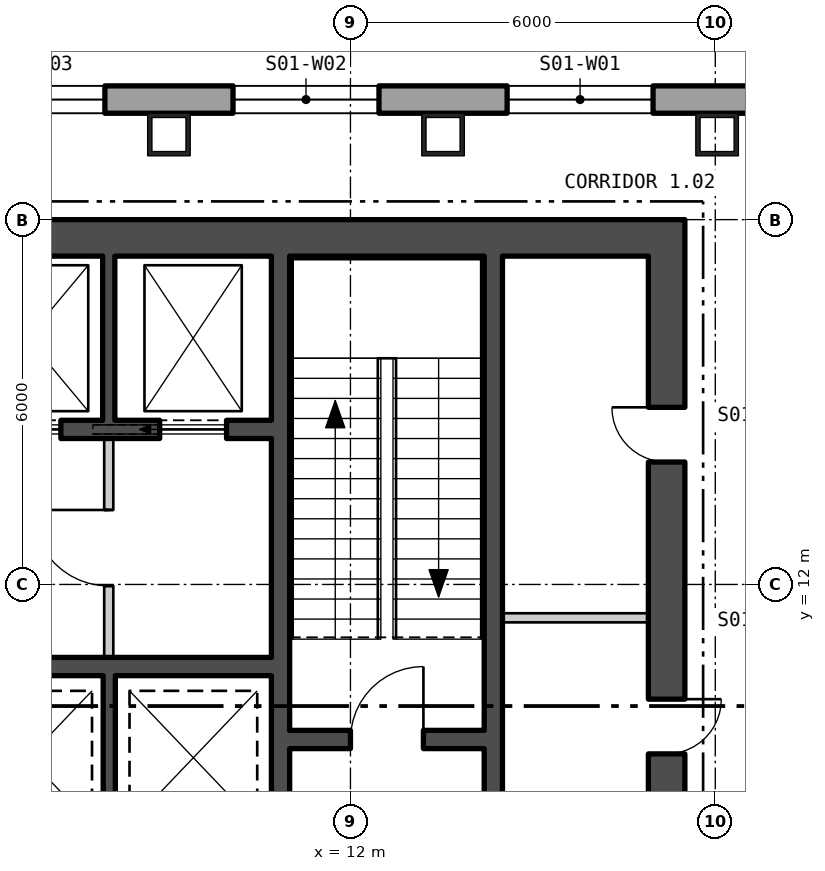
"""IFC4 building model, lengths in metres.
Left out: names, types, materials, properties, quantities, classifications, styles, units other than length and angle.
Written with IfcOpenShell. Run it as: python <this file> out.ifc"""

import sys

from ifc_helpers import new_model, si_unit, direction, frame, frame_2d, origin, origin_2d, place, context, subcontext, project, spatial, polyline, rectangle, hollow_rectangle, outline, extrude, element, fill, save


model = new_model("IFC4")
c1 = context("Model", 3, precision=1e-05, world=origin(), true_north=direction((0.0, 1.0)))
c2 = subcontext(c1, "Body", "Model", "MODEL_VIEW")
j1 = project(units=[si_unit("LENGTHUNIT", "METRE"), si_unit("PLANEANGLEUNIT", "RADIAN")], contexts=[c1])
p1 = place(None, origin())
s1 = spatial("IfcSite", under=j1, at=p1, CompositionType="ELEMENT")
p2 = place(p1, origin())
s2 = spatial("IfcBuilding", under=s1, at=p2, CompositionType="ELEMENT")
p3 = place(p2, frame((0.0, 0.0, 28.8)))
s3 = spatial("IfcBuildingStorey", under=s2, at=p3, CompositionType="ELEMENT", Elevation=28.8)
p4 = place(p3, frame((18.03, 19.4, -0.85), z_axis=(0.0, 0.0, 1.0), x_axis=(-1.0, 0.0, 0.0)))
e1 = element("IfcColumn", 1, at=p4, inside=s3, PredefinedType="COLUMN", context=c2, shape_type="SweptSolid", body=[
    extrude(hollow_rectangle(XDim=0.7, YDim=0.7, WallThickness=0.07, at=origin_2d()), origin(), (0.0, 0.0, 1.0), 5.35),
])
p5 = place(p3, frame((13.523, 19.4, 0.0), z_axis=(0.0, 0.0, 1.0), x_axis=(-1.0, 0.0, 0.0)))
e2 = element("IfcColumn", 2, at=p5, inside=s3, PredefinedType="COLUMN", context=c2, shape_type="SweptSolid", body=[
    extrude(hollow_rectangle(XDim=0.7, YDim=0.7, WallThickness=0.07, at=origin_2d()), origin(), (0.0, 0.0, 1.0), 4.5),
])
p6 = place(p3, frame((9.015, 19.4, -0.85), z_axis=(0.0, 0.0, 1.0), x_axis=(-1.0, 0.0, 0.0)))
e3 = element("IfcColumn", 3, at=p6, inside=s3, PredefinedType="COLUMN", context=c2, shape_type="SweptSolid", body=[
    extrude(hollow_rectangle(XDim=0.7, YDim=0.7, WallThickness=0.07, at=origin_2d()), origin(), (0.0, 0.0, 1.0), 5.35),
])
p7 = place(p3, frame((22.87, 19.975, -0.4), z_axis=(0.0, 0.0, 1.0), x_axis=(-1.0, 0.0, 0.0)))
e4 = element("IfcWall", 4, at=p7, inside=s3, PredefinedType="SOLIDWALL", context=c2, shape_type="SweptSolid", body=[
    extrude(outline(polyline([(-0.13, -0.225), (45.87, -0.225), (45.61, 0.225), (0.13, 0.225), (-0.13, -0.225)])), origin(), (0.0, 0.0, 1.0), 4.5),
])
p8 = place(p7, frame((5.893, 0.0, 1.3)))
e5 = element("IfcOpeningElement", 5, at=p8, cuts=e4, PredefinedType="OPENING", context=c2, shape_type="SweptSolid", body=[
    extrude(rectangle(XDim=2.4, YDim=2.6, at=frame_2d((1.2, 1.3))), frame((0.0, 0.235, 0.0), z_axis=(0.0, -1.0, 0.0), x_axis=(1.0, 0.0, 0.0)), (0.0, 0.0, 1.0), 0.47),
])
p9 = place(p7, frame((10.401, 0.0, 1.3)))
e6 = element("IfcOpeningElement", 6, at=p9, cuts=e4, PredefinedType="OPENING", context=c2, shape_type="SweptSolid", body=[
    extrude(rectangle(XDim=2.4, YDim=2.6, at=frame_2d((1.2, 1.3))), frame((0.0, 0.235, 0.0), z_axis=(0.0, -1.0, 0.0), x_axis=(1.0, 0.0, 0.0)), (0.0, 0.0, 1.0), 0.47),
])
p10 = place(p7, frame((14.909, 0.0, 1.3)))
e7 = element("IfcOpeningElement", 7, at=p10, cuts=e4, PredefinedType="OPENING", context=c2, shape_type="SweptSolid", body=[
    extrude(rectangle(XDim=2.4, YDim=2.6, at=frame_2d((1.2, 1.3))), frame((0.0, 0.235, 0.0), z_axis=(0.0, -1.0, 0.0), x_axis=(1.0, 0.0, 0.0)), (0.0, 0.0, 1.0), 0.47),
])
p11 = place(p7, frame((19.416, 0.0, 1.3)))
e8 = element("IfcOpeningElement", 8, at=p11, cuts=e4, PredefinedType="OPENING", context=c2, shape_type="SweptSolid", body=[
    extrude(rectangle(XDim=2.4, YDim=2.6, at=frame_2d((1.2, 1.3))), frame((0.0, 0.235, 0.0), z_axis=(0.0, -1.0, 0.0), x_axis=(1.0, 0.0, 0.0)), (0.0, 0.0, 1.0), 0.47),
])
p12 = place(p7, frame((23.924, 0.0, 1.3)))
e9 = element("IfcOpeningElement", 9, at=p12, cuts=e4, PredefinedType="OPENING", context=c2, shape_type="SweptSolid", body=[
    extrude(rectangle(XDim=2.4, YDim=2.6, at=frame_2d((1.2, 1.3))), frame((0.0, 0.235, 0.0), z_axis=(0.0, -1.0, 0.0), x_axis=(1.0, 0.0, 0.0)), (0.0, 0.0, 1.0), 0.47),
])
p13 = place(p7, frame((28.431, 0.0, 1.3)))
e10 = element("IfcOpeningElement", 10, at=p13, cuts=e4, PredefinedType="OPENING", context=c2, shape_type="SweptSolid", body=[
    extrude(rectangle(XDim=2.4, YDim=2.6, at=frame_2d((1.2, 1.3))), frame((0.0, 0.235, 0.0), z_axis=(0.0, -1.0, 0.0), x_axis=(1.0, 0.0, 0.0)), (0.0, 0.0, 1.0), 0.47),
])
p14 = place(p7, frame((32.939, 0.0, 1.3)))
e11 = element("IfcOpeningElement", 11, at=p14, cuts=e4, PredefinedType="OPENING", context=c2, shape_type="SweptSolid", body=[
    extrude(rectangle(XDim=2.4, YDim=2.6, at=frame_2d((1.2, 1.3))), frame((0.0, 0.235, 0.0), z_axis=(0.0, -1.0, 0.0), x_axis=(1.0, 0.0, 0.0)), (0.0, 0.0, 1.0), 0.47),
])
p15 = place(p7, frame((37.447, 0.0, 1.3)))
e12 = element("IfcOpeningElement", 12, at=p15, cuts=e4, PredefinedType="OPENING", context=c2, shape_type="SweptSolid", body=[
    extrude(rectangle(XDim=2.4, YDim=2.6, at=frame_2d((1.2, 1.3))), frame((0.0, 0.235, 0.0), z_axis=(0.0, -1.0, 0.0), x_axis=(1.0, 0.0, 0.0)), (0.0, 0.0, 1.0), 0.47),
])
p16 = place(p3, frame((5.87, -29.805, -0.23), z_axis=(0.0, 0.0, 1.0), x_axis=(0.499999764979, 0.866025539474, 0.0)))
e13 = element("IfcWall", 13, at=p16, inside=s3, PredefinedType="SOLIDWALL", context=c2, shape_type="SweptSolid", body=[
    extrude(outline(polyline([(-0.13, -0.225), (45.87, -0.225), (45.61, 0.225), (0.13, 0.225), (-0.13, -0.225)])), origin(), (0.0, 0.0, 1.0), 4.55),
])
p17 = place(p16, frame((1.424, 0.0, 1.13)))
e14 = element("IfcOpeningElement", 14, at=p17, cuts=e13, PredefinedType="OPENING", context=c2, shape_type="SweptSolid", body=[
    extrude(rectangle(XDim=2.4, YDim=2.6, at=frame_2d((1.2, 1.3))), frame((0.0, 0.235, 0.0), z_axis=(0.0, -1.0, 0.0), x_axis=(1.0, 0.0, 0.0)), (0.0, 0.0, 1.0), 0.47),
])
p18 = place(p16, frame((5.893, 0.0, 1.13)))
e15 = element("IfcOpeningElement", 15, at=p18, cuts=e13, PredefinedType="OPENING", context=c2, shape_type="SweptSolid", body=[
    extrude(rectangle(XDim=2.4, YDim=2.6, at=frame_2d((1.2, 1.3))), frame((0.0, 0.235, 0.0), z_axis=(0.0, -1.0, 0.0), x_axis=(1.0, 0.0, 0.0)), (0.0, 0.0, 1.0), 0.47),
])
p19 = place(p16, frame((10.701, 0.0, 0.23)))
e16 = element("IfcOpeningElement", 16, at=p19, cuts=e13, PredefinedType="OPENING", context=c2, shape_type="SweptSolid", body=[
    extrude(rectangle(XDim=1.8, YDim=2.4, at=frame_2d((0.9, 1.2))), frame((0.0, 0.235, 0.0), z_axis=(0.0, -1.0, 0.0), x_axis=(1.0, 0.0, 0.0)), (0.0, 0.0, 1.0), 0.47),
])
p20 = place(p16, frame((14.909, 0.0, 1.13)))
e17 = element("IfcOpeningElement", 17, at=p20, cuts=e13, PredefinedType="OPENING", context=c2, shape_type="SweptSolid", body=[
    extrude(rectangle(XDim=2.4, YDim=2.6, at=frame_2d((1.2, 1.3))), frame((0.0, 0.235, 0.0), z_axis=(0.0, -1.0, 0.0), x_axis=(1.0, 0.0, 0.0)), (0.0, 0.0, 1.0), 0.47),
])
p21 = place(p16, frame((19.416, 0.0, 1.13)))
e18 = element("IfcOpeningElement", 18, at=p21, cuts=e13, PredefinedType="OPENING", context=c2, shape_type="SweptSolid", body=[
    extrude(rectangle(XDim=2.4, YDim=2.6, at=frame_2d((1.2, 1.3))), frame((0.0, 0.235, 0.0), z_axis=(0.0, -1.0, 0.0), x_axis=(1.0, 0.0, 0.0)), (0.0, 0.0, 1.0), 0.47),
])
p22 = place(p16, frame((23.924, 0.0, 1.13)))
e19 = element("IfcOpeningElement", 19, at=p22, cuts=e13, PredefinedType="OPENING", context=c2, shape_type="SweptSolid", body=[
    extrude(rectangle(XDim=2.4, YDim=2.6, at=frame_2d((1.2, 1.3))), frame((0.0, 0.235, 0.0), z_axis=(0.0, -1.0, 0.0), x_axis=(1.0, 0.0, 0.0)), (0.0, 0.0, 1.0), 0.47),
])
p23 = place(p16, frame((37.447, 0.0, 1.13)))
e20 = element("IfcOpeningElement", 20, at=p23, cuts=e13, PredefinedType="OPENING", context=c2, shape_type="SweptSolid", body=[
    extrude(rectangle(XDim=2.4, YDim=2.6, at=frame_2d((1.2, 1.3))), frame((0.0, 0.235, 0.0), z_axis=(0.0, -1.0, 0.0), x_axis=(1.0, 0.0, 0.0)), (0.0, 0.0, 1.0), 0.47),
])
p24 = place(p16, frame((42.216, 0.0, 0.23)))
e21 = element("IfcOpeningElement", 21, at=p24, cuts=e13, PredefinedType="OPENING", context=c2, shape_type="SweptSolid", body=[
    extrude(rectangle(XDim=1.8, YDim=2.4, at=frame_2d((0.9, 1.2))), frame((0.0, 0.235, 0.0), z_axis=(0.0, -1.0, 0.0), x_axis=(1.0, 0.0, 0.0)), (0.0, 0.0, 1.0), 0.47),
])
p25 = place(p3, frame((-17.5, 17.7, 0.0), z_axis=(0.0, 0.0, 1.0), x_axis=(1.0, 0.0, 0.0)))
e22 = element("IfcWall", 22, at=p25, inside=s3, PredefinedType="SHEAR", context=c2, shape_type="SweptSolid", body=[
    extrude(rectangle(XDim=35.0, YDim=0.6, at=frame_2d((17.5, 0.0))), origin(), (0.0, 0.0, 1.0), 4.3),
])
p26 = place(p3, frame((17.2, 0.6, 0.0), z_axis=(0.0, 0.0, 1.0), x_axis=(0.0, 1.0, 0.0)))
e23 = element("IfcWall", 23, at=p26, inside=s3, PredefinedType="SHEAR", context=c2, shape_type="SweptSolid", body=[
    extrude(rectangle(XDim=16.8, YDim=0.6, at=frame_2d((8.4, 0.0))), origin(), (0.0, 0.0, 1.0), 4.3),
])
p27 = place(p26, frame((5.7, 0.0, 0.0)))
e24 = element("IfcOpeningElement", 24, at=p27, cuts=e23, PredefinedType="OPENING", context=c2, shape_type="SweptSolid", body=[
    extrude(rectangle(XDim=1.5, YDim=2.1, at=frame_2d((0.75, 1.05))), frame((0.0, 0.31, 0.0), z_axis=(0.0, -1.0, 0.0), x_axis=(1.0, 0.0, 0.0)), (0.0, 0.0, 1.0), 0.62),
])
p28 = place(p26, frame((1.5, 0.0, 0.0)))
e25 = element("IfcOpeningElement", 25, at=p28, cuts=e23, PredefinedType="OPENING", context=c2, shape_type="SweptSolid", body=[
    extrude(rectangle(XDim=0.9, YDim=2.1, at=frame_2d((0.45, 1.05))), frame((0.0, 0.31, 0.0), z_axis=(0.0, -1.0, 0.0), x_axis=(1.0, 0.0, 0.0)), (0.0, 0.0, 1.0), 0.62),
])
p29 = place(p26, frame((4.3, 0.0, 0.0)))
e26 = element("IfcOpeningElement", 26, at=p29, cuts=e23, PredefinedType="OPENING", context=c2, shape_type="SweptSolid", body=[
    extrude(rectangle(XDim=1.0, YDim=2.1, at=frame_2d((0.5, 1.05))), frame((0.0, 0.31, 0.0), z_axis=(0.0, -1.0, 0.0), x_axis=(1.0, 0.0, 0.0)), (0.0, 0.0, 1.0), 0.62),
])
p30 = place(p26, frame((8.613, 0.0, 0.0)))
e27 = element("IfcOpeningElement", 27, at=p30, cuts=e23, PredefinedType="OPENING", context=c2, shape_type="SweptSolid", body=[
    extrude(rectangle(XDim=0.9, YDim=2.1, at=frame_2d((0.45, 1.05))), frame((0.0, 0.31, 0.0), z_axis=(0.0, -1.0, 0.0), x_axis=(1.0, 0.0, 0.0)), (0.0, 0.0, 1.0), 0.62),
])
p31 = place(p26, frame((13.413, 0.0, 0.0)))
e28 = element("IfcOpeningElement", 28, at=p31, cuts=e23, PredefinedType="OPENING", context=c2, shape_type="SweptSolid", body=[
    extrude(rectangle(XDim=0.9, YDim=2.1, at=frame_2d((0.45, 1.05))), frame((0.0, 0.31, 0.0), z_axis=(0.0, -1.0, 0.0), x_axis=(1.0, 0.0, 0.0)), (0.0, 0.0, 1.0), 0.62),
])
p32 = place(p3, frame((10.85, 0.6, 0.0), z_axis=(0.0, 0.0, 1.0), x_axis=(0.0, 1.0, 0.0)))
e29 = element("IfcWall", 29, at=p32, inside=s3, PredefinedType="SHEAR", context=c2, shape_type="SweptSolid", body=[
    extrude(rectangle(XDim=16.8, YDim=0.3, at=frame_2d((8.4, 0.0))), origin(), (0.0, 0.0, 1.0), 4.3),
])
p33 = place(p32, frame((5.075, 0.0, 0.0)))
e30 = element("IfcOpeningElement", 30, at=p33, cuts=e29, PredefinedType="OPENING", context=c2, shape_type="SweptSolid", body=[
    extrude(rectangle(XDim=1.25, YDim=2.1, at=frame_2d((0.625, 1.05))), frame((0.0, 0.16, 0.0), z_axis=(0.0, -1.0, 0.0), x_axis=(1.0, 0.0, 0.0)), (0.0, 0.0, 1.0), 0.32),
])
p34 = place(p32, frame((1.525, 0.0, 0.0)))
e31 = element("IfcOpeningElement", 31, at=p34, cuts=e29, PredefinedType="OPENING", context=c2, shape_type="SweptSolid", body=[
    extrude(rectangle(XDim=1.0, YDim=2.1, at=frame_2d((0.5, 1.05))), frame((0.0, 0.16, 0.0), z_axis=(0.0, -1.0, 0.0), x_axis=(1.0, 0.0, 0.0)), (0.0, 0.0, 1.0), 0.32),
])
p35 = place(p3, frame((14.35, 0.6, 0.0), z_axis=(0.0, 0.0, 1.0), x_axis=(0.0, 1.0, 0.0)))
e32 = element("IfcWall", 32, at=p35, inside=s3, PredefinedType="SHEAR", context=c2, shape_type="SweptSolid", body=[
    extrude(rectangle(XDim=16.8, YDim=0.3, at=frame_2d((8.4, 0.0))), origin(), (0.0, 0.0, 1.0), 4.3),
])
p36 = place(p35, frame((5.7, 0.0, 0.0)))
e33 = element("IfcOpeningElement", 33, at=p36, cuts=e32, PredefinedType="OPENING", context=c2, shape_type="SweptSolid", body=[
    extrude(rectangle(XDim=1.5, YDim=2.1, at=frame_2d((0.75, 1.05))), frame((0.0, 0.16, 0.0), z_axis=(0.0, -1.0, 0.0), x_axis=(1.0, 0.0, 0.0)), (0.0, 0.0, 1.0), 0.32),
])
p37 = place(p3, frame((11.0, 9.45, 0.0), z_axis=(0.0, 0.0, 1.0), x_axis=(1.0, 0.0, 0.0)))
e34 = element("IfcWall", 34, at=p37, inside=s3, PredefinedType="SHEAR", context=c2, shape_type="SweptSolid", body=[
    extrude(rectangle(XDim=3.2, YDim=0.3, at=frame_2d((1.6, 0.0))), origin(), (0.0, 0.0, 1.0), 4.3),
])
p38 = place(p37, frame((1.0, 0.0, 0.0)))
e35 = element("IfcOpeningElement", 35, at=p38, cuts=e34, PredefinedType="OPENING", context=c2, shape_type="SweptSolid", body=[
    extrude(rectangle(XDim=1.2, YDim=2.1, at=frame_2d((0.6, 1.05))), frame((0.0, 0.16, 0.0), z_axis=(0.0, -1.0, 0.0), x_axis=(1.0, 0.0, 0.0)), (0.0, 0.0, 1.0), 0.32),
])
p39 = place(p3, frame((-10.7, 14.55, 0.0), z_axis=(0.0, 0.0, 1.0), x_axis=(1.0, 0.0, 0.0)))
e36 = element("IfcWall", 36, at=p39, inside=s3, PredefinedType="SHEAR", context=c2, shape_type="SweptSolid", body=[
    extrude(rectangle(XDim=21.4, YDim=0.3, at=frame_2d((10.7, 0.0))), origin(), (0.0, 0.0, 1.0), 4.3),
])
p40 = place(p39, frame((0.738, 0.0, 0.0)))
e37 = element("IfcOpeningElement", 37, at=p40, cuts=e36, PredefinedType="OPENING", context=c2, shape_type="SweptSolid", body=[
    extrude(rectangle(XDim=1.1, YDim=2.1, at=frame_2d((0.55, 1.05))), frame((0.0, 0.16, 0.0), z_axis=(0.0, -1.0, 0.0), x_axis=(1.0, 0.0, 0.0)), (0.0, 0.0, 1.0), 0.32),
])
p41 = place(p39, frame((3.462, 0.0, 0.0)))
e38 = element("IfcOpeningElement", 38, at=p41, cuts=e36, PredefinedType="OPENING", context=c2, shape_type="SweptSolid", body=[
    extrude(rectangle(XDim=1.1, YDim=2.1, at=frame_2d((0.55, 1.05))), frame((0.0, 0.16, 0.0), z_axis=(0.0, -1.0, 0.0), x_axis=(1.0, 0.0, 0.0)), (0.0, 0.0, 1.0), 0.32),
])
p42 = place(p39, frame((6.138, 0.0, 0.0)))
e39 = element("IfcOpeningElement", 39, at=p42, cuts=e36, PredefinedType="OPENING", context=c2, shape_type="SweptSolid", body=[
    extrude(rectangle(XDim=1.1, YDim=2.1, at=frame_2d((0.55, 1.05))), frame((0.0, 0.16, 0.0), z_axis=(0.0, -1.0, 0.0), x_axis=(1.0, 0.0, 0.0)), (0.0, 0.0, 1.0), 0.32),
])
p43 = place(p39, frame((8.812, 0.0, 0.0)))
e40 = element("IfcOpeningElement", 40, at=p43, cuts=e36, PredefinedType="OPENING", context=c2, shape_type="SweptSolid", body=[
    extrude(rectangle(XDim=1.1, YDim=2.1, at=frame_2d((0.55, 1.05))), frame((0.0, 0.16, 0.0), z_axis=(0.0, -1.0, 0.0), x_axis=(1.0, 0.0, 0.0)), (0.0, 0.0, 1.0), 0.32),
])
p44 = place(p39, frame((14.162, 0.0, 0.0)))
e41 = element("IfcOpeningElement", 41, at=p44, cuts=e36, PredefinedType="OPENING", context=c2, shape_type="SweptSolid", body=[
    extrude(rectangle(XDim=1.1, YDim=2.1, at=frame_2d((0.55, 1.05))), frame((0.0, 0.16, 0.0), z_axis=(0.0, -1.0, 0.0), x_axis=(1.0, 0.0, 0.0)), (0.0, 0.0, 1.0), 0.32),
])
p45 = place(p39, frame((16.837, 0.0, 0.0)))
e42 = element("IfcOpeningElement", 42, at=p45, cuts=e36, PredefinedType="OPENING", context=c2, shape_type="SweptSolid", body=[
    extrude(rectangle(XDim=1.1, YDim=2.1, at=frame_2d((0.55, 1.05))), frame((0.0, 0.16, 0.0), z_axis=(0.0, -1.0, 0.0), x_axis=(1.0, 0.0, 0.0)), (0.0, 0.0, 1.0), 0.32),
])
p46 = place(p39, frame((19.562, 0.0, 0.0)))
e43 = element("IfcOpeningElement", 43, at=p46, cuts=e36, PredefinedType="OPENING", context=c2, shape_type="SweptSolid", body=[
    extrude(rectangle(XDim=1.1, YDim=2.1, at=frame_2d((0.55, 1.05))), frame((0.0, 0.16, 0.0), z_axis=(0.0, -1.0, 0.0), x_axis=(1.0, 0.0, 0.0)), (0.0, 0.0, 1.0), 0.32),
])
p47 = place(p3, frame((2.6, 10.65, 0.0), z_axis=(0.0, 0.0, 1.0), x_axis=(1.0, 0.0, 0.0)))
e44 = element("IfcWall", 44, at=p47, inside=s3, PredefinedType="SHEAR", context=c2, shape_type="SweptSolid", body=[
    extrude(rectangle(XDim=8.1, YDim=0.3, at=frame_2d((4.05, 0.0))), origin(), (0.0, 0.0, 1.0), 4.3),
])
for number, where, z_axis, x_axis in (
    (45, (8.025, 14.7, 0.0), (0.0, 0.0, 1.0), (0.0, 1.0, 0.0)),
    (46, (8.033, 7.8, 0.0), (0.0, 0.0, 1.0), (0.0, 1.0, 0.0)),
):
    element("IfcWall", number, at=place(p3, frame(where, z_axis=z_axis, x_axis=x_axis)), inside=s3, PredefinedType="SHEAR", context=c2, shape_type="SweptSolid", body=[
        extrude(rectangle(XDim=2.7, YDim=0.2, at=frame_2d((1.35, 0.0))), origin(), (0.0, 0.0, 1.0), 4.3),
    ])
p48 = place(p3, frame((8.025, 10.8, 0.0), z_axis=(0.0, 0.0, 1.0), x_axis=(0.0, 1.0, 0.0)))
e47 = element("IfcWall", 47, at=p48, inside=s3, PredefinedType="PARTITIONING", context=c2, shape_type="SweptSolid", body=[
    extrude(rectangle(XDim=3.6, YDim=0.15, at=frame_2d((1.8, 0.0))), origin(), (0.0, 0.0, 1.0), 4.3),
])
p49 = place(p48, frame((1.175, 0.0, 0.0)))
e48 = element("IfcOpeningElement", 48, at=p49, cuts=e47, PredefinedType="OPENING", context=c2, shape_type="SweptSolid", body=[
    extrude(rectangle(XDim=1.25, YDim=2.1, at=frame_2d((0.625, 1.05))), frame((0.0, 0.085, 0.0), z_axis=(0.0, -1.0, 0.0), x_axis=(1.0, 0.0, 0.0)), (0.0, 0.0, 1.0), 0.17),
])
p50 = place(p3, frame((14.5, 11.451, 0.0), z_axis=(0.0, 0.0, 1.0), x_axis=(1.0, 0.0, 0.0)))
e49 = element("IfcWall", 49, at=p50, inside=s3, PredefinedType="PARTITIONING", context=c2, shape_type="SweptSolid", body=[
    extrude(rectangle(XDim=2.4, YDim=0.15, at=frame_2d((1.2, 0.0))), origin(), (0.0, 0.0, 1.0), 4.3),
])
p51 = place(p8, origin())
e50 = element("IfcWindow", 50, at=p51, inside=s3, PartitioningType="SINGLE_PANEL", PredefinedType="WINDOW", context=c2, shape_type="SweptSolid", body=[
    extrude(rectangle(XDim=2.4, YDim=2.6, at=frame_2d((1.2, 1.3))), frame((0.0, 0.105, 0.0), z_axis=(0.0, -1.0, 0.0), x_axis=(1.0, 0.0, 0.0)), (0.0, 0.0, 1.0), 0.06),
])
fill(e5, e50)
p52 = place(p9, origin())
e51 = element("IfcWindow", 51, at=p52, inside=s3, PartitioningType="SINGLE_PANEL", PredefinedType="WINDOW", context=c2, shape_type="SweptSolid", body=[
    extrude(rectangle(XDim=2.4, YDim=2.6, at=frame_2d((1.2, 1.3))), frame((0.0, 0.105, 0.0), z_axis=(0.0, -1.0, 0.0), x_axis=(1.0, 0.0, 0.0)), (0.0, 0.0, 1.0), 0.06),
])
fill(e6, e51)
p53 = place(p10, origin())
e52 = element("IfcWindow", 52, at=p53, inside=s3, PartitioningType="SINGLE_PANEL", PredefinedType="WINDOW", context=c2, shape_type="SweptSolid", body=[
    extrude(rectangle(XDim=2.4, YDim=2.6, at=frame_2d((1.2, 1.3))), frame((0.0, 0.105, 0.0), z_axis=(0.0, -1.0, 0.0), x_axis=(1.0, 0.0, 0.0)), (0.0, 0.0, 1.0), 0.06),
])
fill(e7, e52)
p54 = place(p45, origin())
e53 = element("IfcDoor", 53, at=p54, inside=s3, OperationType="SLIDING_TO_LEFT", PredefinedType="DOOR", context=c2, shape_type="SweptSolid", body=[
    extrude(rectangle(XDim=1.1, YDim=2.1, at=frame_2d((0.55, 1.05))), frame((0.0, 0.025, 0.0), z_axis=(0.0, -1.0, 0.0), x_axis=(1.0, 0.0, 0.0)), (0.0, 0.0, 1.0), 0.05),
])
fill(e42, e53)
p55 = place(p46, origin())
e54 = element("IfcDoor", 54, at=p55, inside=s3, OperationType="SLIDING_TO_LEFT", PredefinedType="DOOR", context=c2, shape_type="SweptSolid", body=[
    extrude(rectangle(XDim=1.1, YDim=2.1, at=frame_2d((0.55, 1.05))), frame((0.0, 0.025, 0.0), z_axis=(0.0, -1.0, 0.0), x_axis=(1.0, 0.0, 0.0)), (0.0, 0.0, 1.0), 0.05),
])
fill(e43, e54)
p56 = place(p49, origin())
e55 = element("IfcDoor", 55, at=p56, inside=s3, OperationType="SINGLE_SWING_LEFT", PredefinedType="DOOR", context=c2, shape_type="SweptSolid", body=[
    extrude(rectangle(XDim=1.25, YDim=2.1, at=frame_2d((0.625, 1.05))), frame((0.0, 0.025, 0.0), z_axis=(0.0, -1.0, 0.0), x_axis=(1.0, 0.0, 0.0)), (0.0, 0.0, 1.0), 0.05),
])
fill(e48, e55)
p57 = place(p38, origin())
e56 = element("IfcDoor", 56, at=p57, inside=s3, OperationType="SINGLE_SWING_LEFT", PredefinedType="DOOR", context=c2, shape_type="SweptSolid", body=[
    extrude(rectangle(XDim=1.2, YDim=2.1, at=frame_2d((0.6, 1.05))), frame((0.0, 0.025, 0.0), z_axis=(0.0, -1.0, 0.0), x_axis=(1.0, 0.0, 0.0)), (0.0, 0.0, 1.0), 0.05),
])
fill(e35, e56)
p58 = place(p30, origin())
e57 = element("IfcDoor", 57, at=p58, inside=s3, OperationType="SINGLE_SWING_RIGHT", PredefinedType="DOOR", context=c2, shape_type="SweptSolid", body=[
    extrude(rectangle(XDim=0.9, YDim=2.1, at=frame_2d((0.45, 1.05))), frame((0.0, 0.025, 0.0), z_axis=(0.0, -1.0, 0.0), x_axis=(1.0, 0.0, 0.0)), (0.0, 0.0, 1.0), 0.05),
])
fill(e27, e57)
p59 = place(p31, origin())
e58 = element("IfcDoor", 58, at=p59, inside=s3, OperationType="SINGLE_SWING_LEFT", PredefinedType="DOOR", context=c2, shape_type="SweptSolid", body=[
    extrude(rectangle(XDim=0.9, YDim=2.1, at=frame_2d((0.45, 1.05))), frame((0.0, 0.025, 0.0), z_axis=(0.0, -1.0, 0.0), x_axis=(1.0, 0.0, 0.0)), (0.0, 0.0, 1.0), 0.05),
])
fill(e28, e58)
save(model, sys.argv[1])
